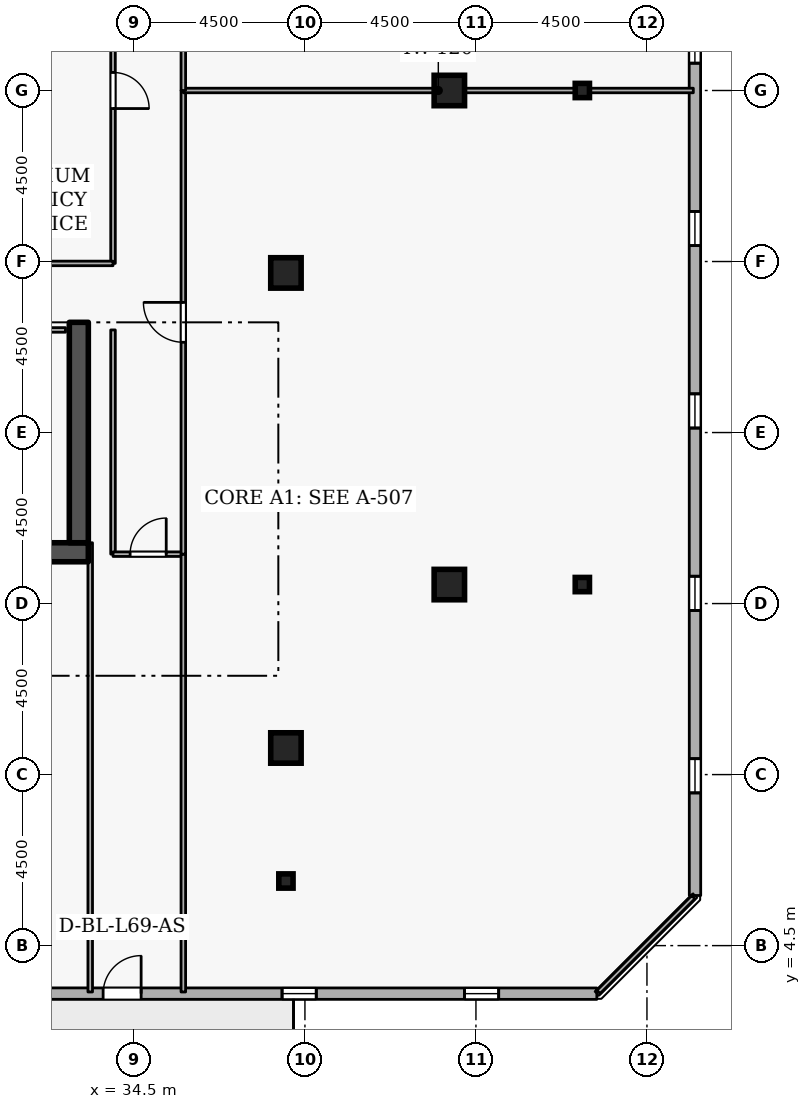
"""IFC4 building model, lengths in metres.
Left out: names, types, materials, properties, quantities, classifications, styles, units other than length and angle.
Written with IfcOpenShell. Run it as: python <this file> out.ifc"""

import sys

from ifc_helpers import new_model, si_unit, direction, frame, frame_2d, origin, origin_2d, place, context, subcontext, project, spatial, rectangle, i_section, extrude, element, fill, save


model = new_model("IFC4")
c1 = context("Model", 3, precision=1e-05, world=origin(), true_north=direction((0.0, 1.0)))
c2 = subcontext(c1, "Body", "Model", "MODEL_VIEW")
j1 = project(units=[si_unit("LENGTHUNIT", "METRE"), si_unit("PLANEANGLEUNIT", "RADIAN")], contexts=[c1])
p1 = place(None, origin())
s1 = spatial("IfcSite", under=j1, at=p1, CompositionType="ELEMENT")
p2 = place(p1, origin())
s2 = spatial("IfcBuilding", under=s1, at=p2, CompositionType="ELEMENT")
p3 = place(p2, frame((0.0, 0.0, 258.3)))
s3 = spatial("IfcBuildingStorey", under=s2, at=p3, CompositionType="ELEMENT", Elevation=258.3)
p4 = place(p3, frame((17.7, 14.85, 0.0), z_axis=(0.0, 0.0, 1.0), x_axis=(1.0, 0.0, 0.0)))
e1 = element("IfcWall", 1, at=p4, inside=s3, PredefinedType="SHEAR", context=c2, shape_type="SweptSolid", body=[
    extrude(rectangle(XDim=15.6, YDim=0.5, at=frame_2d((7.8, 0.0))), origin(), (0.0, 0.0, 1.0), 3.6),
])
p5 = place(p3, frame((33.05, 15.1, 0.0), z_axis=(0.0, 0.0, 1.0), x_axis=(0.0, 1.0, 0.0)))
e2 = element("IfcWall", 2, at=p5, inside=s3, PredefinedType="SHEAR", context=c2, shape_type="SweptSolid", body=[
    extrude(rectangle(XDim=5.8, YDim=0.5, at=frame_2d((2.9, 0.0))), origin(), (0.0, 0.0, 1.0), 3.6),
])
for number, where, z_axis, x_axis in (
    (3, (38.5, 9.7, 0.0), (0.0, 0.0, 1.0), (1.0, 0.0, 0.0)),
    (4, (42.8, 14.0, 0.0), (0.0, 0.0, 1.0), (1.0, 0.0, 0.0)),
    (5, (42.8, 27.0, 0.0), (0.0, 0.0, 1.0), (1.0, 0.0, 0.0)),
    (6, (38.5, 22.2, 0.0), (0.0, 0.0, 1.0), (1.0, 0.0, 0.0)),
):
    element("IfcColumn", number, at=place(p3, frame(where, z_axis=z_axis, x_axis=x_axis)), inside=s3, PredefinedType="COLUMN", context=c2, shape_type="SweptSolid", body=[
        extrude(rectangle(XDim=0.8, YDim=0.8, at=origin_2d()), origin(), (0.0, 0.0, 1.0), 3.6),
    ])
for number, where, z_axis, x_axis in (
    (7, (38.5, 6.2, 0.0), (0.0, 0.0, 1.0), (1.0, 0.0, 0.0)),
    (8, (46.3, 14.0, 0.0), (0.0, 0.0, 1.0), (1.0, 0.0, 0.0)),
    (9, (46.3, 27.0, 0.0), (0.0, 0.0, 1.0), (1.0, 0.0, 0.0)),
):
    element("IfcColumn", number, at=place(p3, frame(where, z_axis=z_axis, x_axis=x_axis)), inside=s3, PredefinedType="COLUMN", context=c2, shape_type="SweptSolid", body=[
        extrude(i_section(OverallWidth=0.375, OverallDepth=0.375, WebThickness=0.017, FlangeThickness=0.027, FilletRadius=0.015, at=origin_2d()), origin(), (0.0, 0.0, 1.0), 3.6),
    ])
p6 = place(p3, frame((11.698, 3.24, 0.0), z_axis=(0.0, 0.0, 1.0), x_axis=(0.999999991209, -0.000132597301, 0.0)))
e10 = element("IfcWall", 10, at=p6, inside=s3, PredefinedType="STANDARD", context=c2, shape_type="SweptSolid", body=[
    extrude(rectangle(XDim=34.983, YDim=0.3, at=frame_2d((17.492, 0.0))), origin(), (0.0, 0.0, 1.0), 2.7),
])
p7 = place(p6, frame((21.992, 0.0, 0.0)))
e11 = element("IfcOpeningElement", 11, at=p7, cuts=e10, PredefinedType="OPENING", context=c2, shape_type="SweptSolid", body=[
    extrude(rectangle(XDim=1.0, YDim=2.08, at=frame_2d((0.5, 1.04))), frame((0.0, 0.16, 0.0), z_axis=(0.0, -1.0, 0.0), x_axis=(1.0, 0.0, 0.0)), (0.0, 0.0, 1.0), 0.32),
])
p8 = place(p6, frame((7.5, 0.0, 0.72)))
e12 = element("IfcOpeningElement", 12, at=p8, cuts=e10, PredefinedType="OPENING", context=c2, shape_type="SweptSolid", body=[
    extrude(rectangle(XDim=0.9, YDim=1.75, at=frame_2d((0.45, 0.875))), frame((0.0, 0.16, 0.0), z_axis=(0.0, -1.0, 0.0), x_axis=(1.0, 0.0, 0.0)), (0.0, 0.0, 1.0), 0.32),
])
p9 = place(p6, frame((12.3, 0.0, 0.72)))
e13 = element("IfcOpeningElement", 13, at=p9, cuts=e10, PredefinedType="OPENING", context=c2, shape_type="SweptSolid", body=[
    extrude(rectangle(XDim=0.9, YDim=1.75, at=frame_2d((0.45, 0.875))), frame((0.0, 0.16, 0.0), z_axis=(0.0, -1.0, 0.0), x_axis=(1.0, 0.0, 0.0)), (0.0, 0.0, 1.0), 0.32),
])
p10 = place(p6, frame((17.1, 0.0, 0.72)))
e14 = element("IfcOpeningElement", 14, at=p10, cuts=e10, PredefinedType="OPENING", context=c2, shape_type="SweptSolid", body=[
    extrude(rectangle(XDim=0.9, YDim=1.75, at=frame_2d((0.45, 0.875))), frame((0.0, 0.16, 0.0), z_axis=(0.0, -1.0, 0.0), x_axis=(1.0, 0.0, 0.0)), (0.0, 0.0, 1.0), 0.32),
])
p11 = place(p6, frame((26.7, 0.0, 0.72)))
e15 = element("IfcOpeningElement", 15, at=p11, cuts=e10, PredefinedType="OPENING", context=c2, shape_type="SweptSolid", body=[
    extrude(rectangle(XDim=0.9, YDim=1.75, at=frame_2d((0.45, 0.875))), frame((0.0, 0.16, 0.0), z_axis=(0.0, -1.0, 0.0), x_axis=(1.0, 0.0, 0.0)), (0.0, 0.0, 1.0), 0.32),
])
p12 = place(p6, frame((31.5, 0.0, 0.72)))
e16 = element("IfcOpeningElement", 16, at=p12, cuts=e10, PredefinedType="OPENING", context=c2, shape_type="SweptSolid", body=[
    extrude(rectangle(XDim=0.9, YDim=1.75, at=frame_2d((0.45, 0.875))), frame((0.0, 0.16, 0.0), z_axis=(0.0, -1.0, 0.0), x_axis=(1.0, 0.0, 0.0)), (0.0, 0.0, 1.0), 0.32),
])
p13 = place(p3, frame((49.265, 5.819, 0.0), z_axis=(0.0, 0.0, 1.0), x_axis=(-0.000132597301, 0.999999991209, 0.0)))
e17 = element("IfcWall", 17, at=p13, inside=s3, PredefinedType="STANDARD", context=c2, shape_type="SweptSolid", body=[
    extrude(rectangle(XDim=34.983, YDim=0.3, at=frame_2d((17.492, 0.0))), origin(), (0.0, 0.0, 1.0), 2.7),
])
p14 = place(p13, frame((2.7, 0.0, 0.72)))
e18 = element("IfcOpeningElement", 18, at=p14, cuts=e17, PredefinedType="OPENING", context=c2, shape_type="SweptSolid", body=[
    extrude(rectangle(XDim=0.9, YDim=1.75, at=frame_2d((0.45, 0.875))), frame((0.0, 0.16, 0.0), z_axis=(0.0, -1.0, 0.0), x_axis=(1.0, 0.0, 0.0)), (0.0, 0.0, 1.0), 0.32),
])
p15 = place(p13, frame((7.5, 0.0, 0.72)))
e19 = element("IfcOpeningElement", 19, at=p15, cuts=e17, PredefinedType="OPENING", context=c2, shape_type="SweptSolid", body=[
    extrude(rectangle(XDim=0.9, YDim=1.75, at=frame_2d((0.45, 0.875))), frame((0.0, 0.16, 0.0), z_axis=(0.0, -1.0, 0.0), x_axis=(1.0, 0.0, 0.0)), (0.0, 0.0, 1.0), 0.32),
])
p16 = place(p13, frame((12.3, 0.0, 0.72)))
e20 = element("IfcOpeningElement", 20, at=p16, cuts=e17, PredefinedType="OPENING", context=c2, shape_type="SweptSolid", body=[
    extrude(rectangle(XDim=0.9, YDim=1.75, at=frame_2d((0.45, 0.875))), frame((0.0, 0.16, 0.0), z_axis=(0.0, -1.0, 0.0), x_axis=(1.0, 0.0, 0.0)), (0.0, 0.0, 1.0), 0.32),
])
p17 = place(p13, frame((17.1, 0.0, 0.72)))
e21 = element("IfcOpeningElement", 21, at=p17, cuts=e17, PredefinedType="OPENING", context=c2, shape_type="SweptSolid", body=[
    extrude(rectangle(XDim=0.9, YDim=1.75, at=frame_2d((0.45, 0.875))), frame((0.0, 0.16, 0.0), z_axis=(0.0, -1.0, 0.0), x_axis=(1.0, 0.0, 0.0)), (0.0, 0.0, 1.0), 0.32),
])
p18 = place(p13, frame((21.9, 0.0, 0.72)))
e22 = element("IfcOpeningElement", 22, at=p18, cuts=e17, PredefinedType="OPENING", context=c2, shape_type="SweptSolid", body=[
    extrude(rectangle(XDim=0.9, YDim=1.75, at=frame_2d((0.45, 0.875))), frame((0.0, 0.16, 0.0), z_axis=(0.0, -1.0, 0.0), x_axis=(1.0, 0.0, 0.0)), (0.0, 0.0, 1.0), 0.32),
])
p19 = place(p13, frame((26.7, 0.0, 0.72)))
e23 = element("IfcOpeningElement", 23, at=p19, cuts=e17, PredefinedType="OPENING", context=c2, shape_type="SweptSolid", body=[
    extrude(rectangle(XDim=0.9, YDim=1.75, at=frame_2d((0.45, 0.875))), frame((0.0, 0.16, 0.0), z_axis=(0.0, -1.0, 0.0), x_axis=(1.0, 0.0, 0.0)), (0.0, 0.0, 1.0), 0.32),
])
p20 = place(p13, frame((31.5, 0.0, 0.72)))
e24 = element("IfcOpeningElement", 24, at=p20, cuts=e17, PredefinedType="OPENING", context=c2, shape_type="SweptSolid", body=[
    extrude(rectangle(XDim=0.9, YDim=1.75, at=frame_2d((0.45, 0.875))), frame((0.0, 0.16, 0.0), z_axis=(0.0, -1.0, 0.0), x_axis=(1.0, 0.0, 0.0)), (0.0, 0.0, 1.0), 0.32),
])
p21 = place(p3, frame((30.6, 20.7, 0.0), z_axis=(0.0, 0.0, 1.0), x_axis=(1.0, 0.0, 0.0)))
e25 = element("IfcWall", 25, at=p21, inside=s3, PredefinedType="PARTITIONING", context=c2, shape_type="SweptSolid", body=[
    extrude(rectangle(XDim=2.1, YDim=0.12, at=frame_2d((1.05, 0.0))), origin(), (0.0, 0.0, 1.0), 3.34),
])
p22 = place(p21, frame((0.575, 0.0, 0.0)))
e26 = element("IfcOpeningElement", 26, at=p22, cuts=e25, PredefinedType="OPENING", context=c2, shape_type="SweptSolid", body=[
    extrude(rectangle(XDim=0.95, YDim=2.1, at=frame_2d((0.475, 1.05))), frame((0.0, 0.07, 0.0), z_axis=(0.0, -1.0, 0.0), x_axis=(1.0, 0.0, 0.0)), (0.0, 0.0, 1.0), 0.14),
])
p23 = place(p3, frame((33.95, 20.7, 0.0), z_axis=(0.0, 0.0, 1.0), x_axis=(0.0, -1.0, 0.0)))
e27 = element("IfcWall", 27, at=p23, inside=s3, PredefinedType="PARTITIONING", context=c2, shape_type="SweptSolid", body=[
    extrude(rectangle(XDim=5.9, YDim=0.12, at=frame_2d((2.95, 0.0))), origin(), (0.0, 0.0, 1.0), 3.34),
])
p24 = place(p3, frame((33.95, 14.8, 0.0), z_axis=(0.0, 0.0, 1.0), x_axis=(1.0, 0.0, 0.0)))
e28 = element("IfcWall", 28, at=p24, inside=s3, PredefinedType="PARTITIONING", context=c2, shape_type="SweptSolid", body=[
    extrude(rectangle(XDim=1.85, YDim=0.12, at=frame_2d((0.925, 0.0))), origin(), (0.0, 0.0, 1.0), 3.34),
])
p25 = place(p24, frame((0.45, 0.0, 0.0)))
e29 = element("IfcOpeningElement", 29, at=p25, cuts=e28, PredefinedType="OPENING", context=c2, shape_type="SweptSolid", body=[
    extrude(rectangle(XDim=0.95, YDim=2.1, at=frame_2d((0.475, 1.05))), frame((0.0, 0.07, 0.0), z_axis=(0.0, -1.0, 0.0), x_axis=(1.0, 0.0, 0.0)), (0.0, 0.0, 1.0), 0.14),
])
p26 = place(p3, frame((35.8, 14.8, 0.0), z_axis=(0.0, 0.0, 1.0), x_axis=(0.0, -1.0, 0.0)))
e30 = element("IfcWall", 30, at=p26, inside=s3, PredefinedType="PARTITIONING", context=c2, shape_type="SweptSolid", body=[
    extrude(rectangle(XDim=11.52, YDim=0.12, at=frame_2d((5.76, 0.0))), origin(), (0.0, 0.0, 1.0), 3.34),
])
p27 = place(p3, frame((33.35, 3.28, 0.0), z_axis=(0.0, 0.0, 1.0), x_axis=(0.0, 1.0, 0.0)))
e31 = element("IfcWall", 31, at=p27, inside=s3, PredefinedType="PARTITIONING", context=c2, shape_type="SweptSolid", body=[
    extrude(rectangle(XDim=11.82, YDim=0.12, at=frame_2d((5.91, 0.0))), origin(), (0.0, 0.0, 1.0), 2.545),
])
p28 = place(p3, frame((35.8, 14.8, 0.0), z_axis=(0.0, 0.0, 1.0), x_axis=(0.0, 1.0, 0.0)))
e32 = element("IfcWall", 32, at=p28, inside=s3, PredefinedType="PARTITIONING", context=c2, shape_type="SweptSolid", body=[
    extrude(rectangle(XDim=12.2, YDim=0.12, at=frame_2d((6.1, 0.0))), origin(), (0.0, 0.0, 1.0), 3.34),
])
p29 = place(p28, frame((5.575, 0.0, 0.0)))
e33 = element("IfcOpeningElement", 33, at=p29, cuts=e32, PredefinedType="OPENING", context=c2, shape_type="SweptSolid", body=[
    extrude(rectangle(XDim=1.05, YDim=2.1, at=frame_2d((0.525, 1.05))), frame((0.0, 0.07, 0.0), z_axis=(0.0, -1.0, 0.0), x_axis=(1.0, 0.0, 0.0)), (0.0, 0.0, 1.0), 0.14),
])
p30 = place(p3, frame((35.8, 27.0, 0.0), z_axis=(0.0, 0.0, 1.0), x_axis=(1.0, 0.0, 0.0)))
e34 = element("IfcWall", 34, at=p30, inside=s3, PredefinedType="PARTITIONING", context=c2, shape_type="SweptSolid", body=[
    extrude(rectangle(XDim=13.42, YDim=0.12, at=frame_2d((6.71, 0.0))), origin(), (0.0, 0.0, 1.0), 2.932),
])
p31 = place(p3, frame((49.22, 5.775, 0.0), z_axis=(0.0, 0.0, 1.0), x_axis=(-0.707106781187, -0.707106781187, 0.0)))
e35 = element("IfcWall", 35, at=p31, inside=s3, PredefinedType="PARTITIONING", context=c2, shape_type="SweptSolid", body=[
    extrude(rectangle(XDim=3.528, YDim=0.12, at=frame_2d((1.764, 0.0))), origin(), (0.0, 0.0, 1.0), 3.34),
])
p32 = place(p3, frame((35.8, 27.0, 0.0), z_axis=(0.0, 0.0, 1.0), x_axis=(0.0, 1.0, 0.0)))
e36 = element("IfcWall", 36, at=p32, inside=s3, PredefinedType="PARTITIONING", context=c2, shape_type="SweptSolid", body=[
    extrude(rectangle(XDim=6.3, YDim=0.12, at=frame_2d((3.15, 0.0))), origin(), (0.0, 0.0, 1.0), 3.34),
])
p33 = place(p32, frame((2.625, 0.0, 0.0)))
e37 = element("IfcOpeningElement", 37, at=p33, cuts=e36, PredefinedType="OPENING", context=c2, shape_type="SweptSolid", body=[
    extrude(rectangle(XDim=1.05, YDim=2.1, at=frame_2d((0.525, 1.05))), frame((0.0, 0.07, 0.0), z_axis=(0.0, -1.0, 0.0), x_axis=(1.0, 0.0, 0.0)), (0.0, 0.0, 1.0), 0.14),
])
p34 = place(p3, frame((33.95, 31.55, 0.0), z_axis=(0.0, 0.0, 1.0), x_axis=(0.0, -1.0, 0.0)))
e38 = element("IfcWall", 38, at=p34, inside=s3, PredefinedType="PARTITIONING", context=c2, shape_type="SweptSolid", body=[
    extrude(rectangle(XDim=9.1, YDim=0.12, at=frame_2d((4.55, 0.0))), origin(), (0.0, 0.0, 1.0), 3.34),
])
p35 = place(p34, frame((4.075, 0.0, 0.0)))
e39 = element("IfcOpeningElement", 39, at=p35, cuts=e38, PredefinedType="OPENING", context=c2, shape_type="SweptSolid", body=[
    extrude(rectangle(XDim=0.95, YDim=2.1, at=frame_2d((0.475, 1.05))), frame((0.0, 0.07, 0.0), z_axis=(0.0, -1.0, 0.0), x_axis=(1.0, 0.0, 0.0)), (0.0, 0.0, 1.0), 0.14),
])
p36 = place(p3, frame((33.95, 22.45, 0.0), z_axis=(0.0, 0.0, 1.0), x_axis=(-1.0, 0.0, 0.0)))
e40 = element("IfcWall", 40, at=p36, inside=s3, PredefinedType="PARTITIONING", context=c2, shape_type="SweptSolid", body=[
    extrude(rectangle(XDim=3.25, YDim=0.12, at=frame_2d((1.625, 0.0))), origin(), (0.0, 0.0, 1.0), 3.34),
])
p37 = place(p7, origin())
e41 = element("IfcDoor", 41, at=p37, inside=s3, OperationType="SINGLE_SWING_RIGHT", PredefinedType="DOOR", context=c2, shape_type="SweptSolid", body=[
    extrude(rectangle(XDim=1.0, YDim=2.08, at=frame_2d((0.5, 1.04))), frame((0.0, 0.025, 0.0), z_axis=(0.0, -1.0, 0.0), x_axis=(1.0, 0.0, 0.0)), (0.0, 0.0, 1.0), 0.05),
])
fill(e11, e41)
p38 = place(p11, origin())
e42 = element("IfcWindow", 42, at=p38, inside=s3, PartitioningType="SINGLE_PANEL", PredefinedType="WINDOW", context=c2, shape_type="SweptSolid", body=[
    extrude(rectangle(XDim=0.9, YDim=1.75, at=frame_2d((0.45, 0.875))), frame((0.0, 0.03, 0.0), z_axis=(0.0, -1.0, 0.0), x_axis=(1.0, 0.0, 0.0)), (0.0, 0.0, 1.0), 0.06),
])
fill(e15, e42)
p39 = place(p12, origin())
e43 = element("IfcWindow", 43, at=p39, inside=s3, PartitioningType="SINGLE_PANEL", PredefinedType="WINDOW", context=c2, shape_type="SweptSolid", body=[
    extrude(rectangle(XDim=0.9, YDim=1.75, at=frame_2d((0.45, 0.875))), frame((0.0, 0.03, 0.0), z_axis=(0.0, -1.0, 0.0), x_axis=(1.0, 0.0, 0.0)), (0.0, 0.0, 1.0), 0.06),
])
fill(e16, e43)
p40 = place(p14, origin())
e44 = element("IfcWindow", 44, at=p40, inside=s3, PartitioningType="SINGLE_PANEL", PredefinedType="WINDOW", context=c2, shape_type="SweptSolid", body=[
    extrude(rectangle(XDim=0.9, YDim=1.75, at=frame_2d((0.45, 0.875))), frame((0.0, 0.03, 0.0), z_axis=(0.0, -1.0, 0.0), x_axis=(1.0, 0.0, 0.0)), (0.0, 0.0, 1.0), 0.06),
])
fill(e18, e44)
p41 = place(p15, origin())
e45 = element("IfcWindow", 45, at=p41, inside=s3, PartitioningType="SINGLE_PANEL", PredefinedType="WINDOW", context=c2, shape_type="SweptSolid", body=[
    extrude(rectangle(XDim=0.9, YDim=1.75, at=frame_2d((0.45, 0.875))), frame((0.0, 0.03, 0.0), z_axis=(0.0, -1.0, 0.0), x_axis=(1.0, 0.0, 0.0)), (0.0, 0.0, 1.0), 0.06),
])
fill(e19, e45)
p42 = place(p16, origin())
e46 = element("IfcWindow", 46, at=p42, inside=s3, PartitioningType="SINGLE_PANEL", PredefinedType="WINDOW", context=c2, shape_type="SweptSolid", body=[
    extrude(rectangle(XDim=0.9, YDim=1.75, at=frame_2d((0.45, 0.875))), frame((0.0, 0.03, 0.0), z_axis=(0.0, -1.0, 0.0), x_axis=(1.0, 0.0, 0.0)), (0.0, 0.0, 1.0), 0.06),
])
fill(e20, e46)
p43 = place(p17, origin())
e47 = element("IfcWindow", 47, at=p43, inside=s3, PartitioningType="SINGLE_PANEL", PredefinedType="WINDOW", context=c2, shape_type="SweptSolid", body=[
    extrude(rectangle(XDim=0.9, YDim=1.75, at=frame_2d((0.45, 0.875))), frame((0.0, 0.03, 0.0), z_axis=(0.0, -1.0, 0.0), x_axis=(1.0, 0.0, 0.0)), (0.0, 0.0, 1.0), 0.06),
])
fill(e21, e47)
p44 = place(p18, origin())
e48 = element("IfcWindow", 48, at=p44, inside=s3, PartitioningType="SINGLE_PANEL", PredefinedType="WINDOW", context=c2, shape_type="SweptSolid", body=[
    extrude(rectangle(XDim=0.9, YDim=1.75, at=frame_2d((0.45, 0.875))), frame((0.0, 0.03, 0.0), z_axis=(0.0, -1.0, 0.0), x_axis=(1.0, 0.0, 0.0)), (0.0, 0.0, 1.0), 0.06),
])
fill(e22, e48)
p45 = place(p25, origin())
e49 = element("IfcDoor", 49, at=p45, inside=s3, OperationType="SINGLE_SWING_RIGHT", PredefinedType="DOOR", context=c2, shape_type="SweptSolid", body=[
    extrude(rectangle(XDim=0.95, YDim=2.1, at=frame_2d((0.475, 1.05))), frame((0.0, 0.025, 0.0), z_axis=(0.0, -1.0, 0.0), x_axis=(1.0, 0.0, 0.0)), (0.0, 0.0, 1.0), 0.05),
])
fill(e29, e49)
p46 = place(p29, origin())
e50 = element("IfcDoor", 50, at=p46, inside=s3, OperationType="SINGLE_SWING_RIGHT", PredefinedType="DOOR", context=c2, shape_type="SweptSolid", body=[
    extrude(rectangle(XDim=1.05, YDim=2.1, at=frame_2d((0.525, 1.05))), frame((0.0, 0.025, 0.0), z_axis=(0.0, -1.0, 0.0), x_axis=(1.0, 0.0, 0.0)), (0.0, 0.0, 1.0), 0.05),
])
fill(e33, e50)
p47 = place(p35, origin())
e51 = element("IfcDoor", 51, at=p47, inside=s3, OperationType="SINGLE_SWING_RIGHT", PredefinedType="DOOR", context=c2, shape_type="SweptSolid", body=[
    extrude(rectangle(XDim=0.95, YDim=2.1, at=frame_2d((0.475, 1.05))), frame((0.0, 0.025, 0.0), z_axis=(0.0, -1.0, 0.0), x_axis=(1.0, 0.0, 0.0)), (0.0, 0.0, 1.0), 0.05),
])
fill(e39, e51)
save(model, sys.argv[1])
